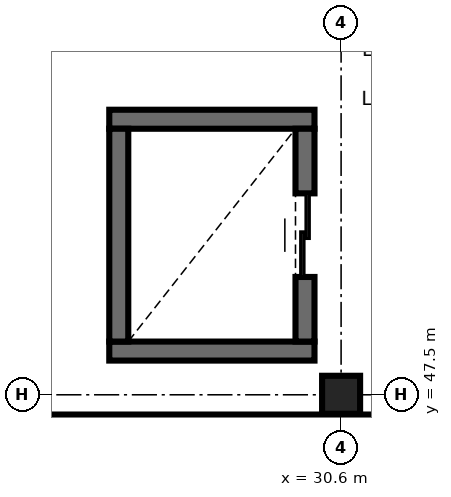
"""IFC4 building model, lengths in metres.
Left out: names, types, materials, properties, quantities, classifications, styles, units other than length and angle.
Written with IfcOpenShell. Run it as: python <this file> out.ifc"""

import sys

from ifc_helpers import new_model, si_unit, direction, frame, frame_2d, origin, origin_2d, place, context, subcontext, project, spatial, rectangle, extrude, element, fill, save


model = new_model("IFC4")
c1 = context("Model", 3, precision=1e-05, world=origin(), true_north=direction((0.0, 1.0)))
c2 = subcontext(c1, "Body", "Model", "MODEL_VIEW")
j1 = project(units=[si_unit("LENGTHUNIT", "METRE"), si_unit("PLANEANGLEUNIT", "RADIAN")], contexts=[c1])
p1 = place(None, origin())
s1 = spatial("IfcSite", under=j1, at=p1, CompositionType="ELEMENT")
p2 = place(p1, origin())
s2 = spatial("IfcBuilding", under=s1, at=p2, CompositionType="ELEMENT")
p3 = place(p2, frame((0.0, 0.0, 30.6)))
s3 = spatial("IfcBuildingStorey", under=s2, at=p3, CompositionType="ELEMENT", Elevation=30.6)
p4 = place(p3, frame((30.6, 47.5, 0.0), z_axis=(0.0, 0.0, 1.0), x_axis=(1.0, 0.0, 0.0)))
e1 = element("IfcColumn", 1, at=p4, inside=s3, PredefinedType="COLUMN", context=c2, shape_type="SweptSolid", body=[
    extrude(rectangle(XDim=0.5, YDim=0.5, at=origin_2d()), origin(), (0.0, 0.0, 1.0), 3.9),
])
for number, where, z_axis, x_axis in (
    (2, (27.55, 48.075, 0.0), (0.0, 0.0, 1.0), (1.0, 0.0, 0.0)),
    (3, (30.25, 51.125, 0.0), (0.0, 0.0, 1.0), (-1.0, 0.0, 0.0)),
):
    element("IfcWall", number, at=place(p3, frame(where, z_axis=z_axis, x_axis=x_axis)), inside=s3, PredefinedType="SHEAR", context=c2, shape_type="SweptSolid", body=[
        extrude(rectangle(XDim=2.7, YDim=0.25, at=frame_2d((1.35, 0.0))), origin(), (0.0, 0.0, 1.0), 3.9),
    ])
p5 = place(p3, frame((27.675, 51.0, 0.0), z_axis=(0.0, 0.0, 1.0), x_axis=(0.0, -1.0, 0.0)))
e4 = element("IfcWall", 4, at=p5, inside=s3, PredefinedType="SHEAR", context=c2, shape_type="SweptSolid", body=[
    extrude(rectangle(XDim=2.8, YDim=0.25, at=frame_2d((1.4, 0.0))), origin(), (0.0, 0.0, 1.0), 3.9),
])
p6 = place(p3, frame((30.125, 48.2, 0.0), z_axis=(0.0, 0.0, 1.0), x_axis=(0.0, 1.0, 0.0)))
e5 = element("IfcWall", 5, at=p6, inside=s3, PredefinedType="SHEAR", context=c2, shape_type="SweptSolid", body=[
    extrude(rectangle(XDim=2.8, YDim=0.25, at=frame_2d((1.4, 0.0))), origin(), (0.0, 0.0, 1.0), 3.9),
])
p7 = place(p6, frame((0.85, 0.0, 0.0)))
e6 = element("IfcOpeningElement", 6, at=p7, cuts=e5, PredefinedType="OPENING", context=c2, shape_type="SweptSolid", body=[
    extrude(rectangle(XDim=1.1, YDim=2.15, at=frame_2d((0.55, 1.075))), frame((0.0, 0.135, 0.0), z_axis=(0.0, -1.0, 0.0), x_axis=(1.0, 0.0, 0.0)), (0.0, 0.0, 1.0), 0.27),
])
p8 = place(p3, frame((14.922, 47.07, 0.0), z_axis=(0.0, 0.0, 1.0), x_axis=(1.0, 0.0, 0.0)))
e7 = element("IfcWall", 7, at=p8, inside=s3, PredefinedType="SOLIDWALL", context=c2, shape_type="SweptSolid", body=[
    extrude(rectangle(XDim=32.478, YDim=0.34, at=frame_2d((16.239, 0.0))), origin(), (0.0, 0.0, 1.0), 3.66),
])
p9 = place(p8, frame((16.608, 0.0, 0.9)))
e8 = element("IfcOpeningElement", 8, at=p9, cuts=e7, PredefinedType="OPENING", context=c2, shape_type="SweptSolid", body=[
    extrude(rectangle(XDim=1.8, YDim=1.5, at=frame_2d((0.9, 0.75))), frame((0.0, 0.18, 0.0), z_axis=(0.0, -1.0, 0.0), x_axis=(1.0, 0.0, 0.0)), (0.0, 0.0, 1.0), 0.36),
])
p10 = place(p8, frame((20.708, 0.0, 0.9)))
e9 = element("IfcOpeningElement", 9, at=p10, cuts=e7, PredefinedType="OPENING", context=c2, shape_type="SweptSolid", body=[
    extrude(rectangle(XDim=1.2, YDim=2.4, at=frame_2d((0.6, 1.2))), frame((0.0, 0.18, 0.0), z_axis=(0.0, -1.0, 0.0), x_axis=(1.0, 0.0, 0.0)), (0.0, 0.0, 1.0), 0.36),
])
p11 = place(p8, frame((26.678, 0.0, 0.9)))
e10 = element("IfcOpeningElement", 10, at=p11, cuts=e7, PredefinedType="OPENING", context=c2, shape_type="SweptSolid", body=[
    extrude(rectangle(XDim=2.0, YDim=2.4, at=frame_2d((1.0, 1.2))), frame((0.0, 0.18, 0.0), z_axis=(0.0, -1.0, 0.0), x_axis=(1.0, 0.0, 0.0)), (0.0, 0.0, 1.0), 0.36),
])
p12 = place(p7, origin())
e11 = element("IfcDoor", 11, at=p12, inside=s3, OperationType="DOUBLE_DOOR_SLIDING", PredefinedType="DOOR", context=c2, shape_type="SweptSolid", body=[
    extrude(rectangle(XDim=1.1, YDim=2.15, at=frame_2d((0.55, 1.075))), frame((0.0, 0.025, 0.0), z_axis=(0.0, -1.0, 0.0), x_axis=(1.0, 0.0, 0.0)), (0.0, 0.0, 1.0), 0.05),
])
fill(e6, e11)
save(model, sys.argv[1])
